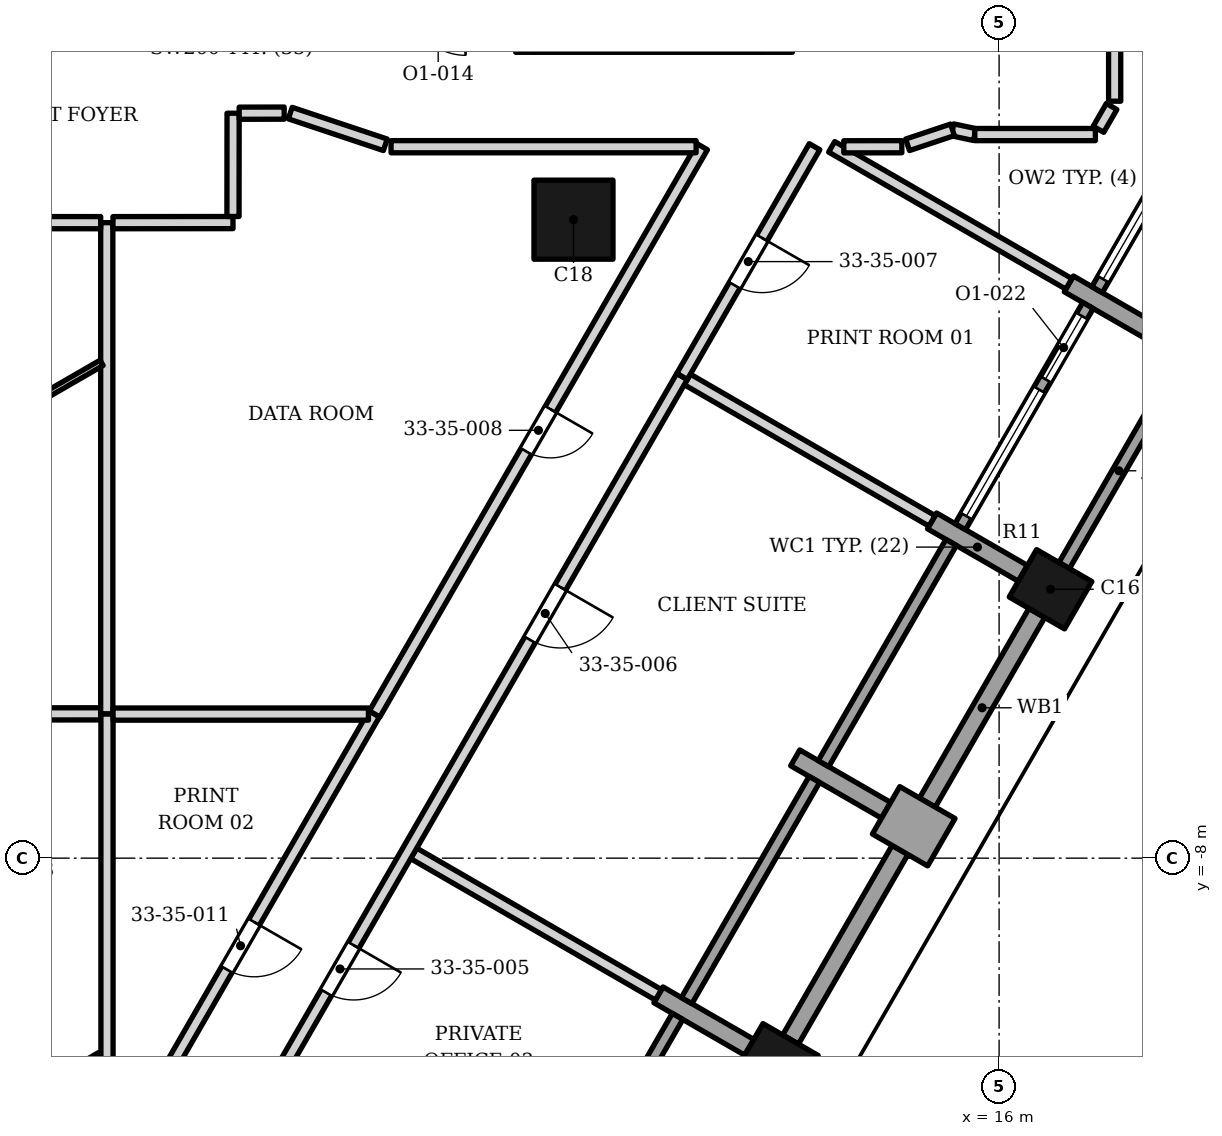
"""IFC4 building model, lengths in metres.
Left out: names, types, materials, properties, quantities, classifications, styles, units other than length and angle.
Written with IfcOpenShell. Run it as: python <this file> out.ifc"""

import sys

from ifc_helpers import new_model, si_unit, direction, frame, frame_2d, origin, origin_2d, place, context, subcontext, project, spatial, polyline, rectangle, outline, extrude, element, fill, save


model = new_model("IFC4")
c1 = context("Model", 3, precision=1e-05, world=origin(), true_north=direction((0.0, 1.0)))
c2 = subcontext(c1, "Body", "Model", "MODEL_VIEW")
j1 = project(units=[si_unit("LENGTHUNIT", "METRE"), si_unit("PLANEANGLEUNIT", "RADIAN")], contexts=[c1])
p1 = place(None, origin())
s1 = spatial("IfcSite", under=j1, at=p1, CompositionType="ELEMENT")
p2 = place(p1, origin())
s2 = spatial("IfcBuilding", under=s1, at=p2, CompositionType="ELEMENT")
p3 = place(p2, frame((0.0, 0.0, 144.6)))
s3 = spatial("IfcBuildingStorey", under=s2, at=p3, CompositionType="ELEMENT", Elevation=144.6)
p4 = place(p3, frame((9.0, 2.5, 0.0), z_axis=(0.0, 0.0, 1.0), x_axis=(1.0, 0.0, 0.0)))
e1 = element("IfcColumn", 1, at=p4, inside=s3, PredefinedType="COLUMN", context=c2, shape_type="SweptSolid", body=[
    extrude(rectangle(XDim=1.3, YDim=1.3, at=origin_2d()), origin(), (0.0, 0.0, 1.0), 3.9),
])
for number, where, z_axis, x_axis in (
    (2, (12.346, -11.373, 0.0), (0.0, 0.0, 1.0), (0.5, 0.866, 0.0)),
    (3, (16.846, -3.578, 0.0), (0.0, 0.0, 1.0), (0.5, 0.866, 0.0)),
):
    element("IfcColumn", number, at=place(p3, frame(where, z_axis=z_axis, x_axis=x_axis)), inside=s3, PredefinedType="COLUMN", context=c2, shape_type="SweptSolid", body=[
        extrude(rectangle(XDim=0.9, YDim=1.05, at=origin_2d()), origin(), (0.0, 0.0, 1.0), 3.9),
    ])
p5 = place(p3, frame((11.891, -11.11, 0.0), z_axis=(0.0, 0.0, 1.0), x_axis=(-0.866013532718, 0.500020560727, 0.0)))
e4 = element("IfcWall", 4, at=p5, inside=s3, PredefinedType="SOLIDWALL", context=c2, shape_type="SweptSolid", body=[
    extrude(rectangle(XDim=1.725, YDim=0.3, at=frame_2d((0.863, 0.0))), origin(), (0.0, 0.0, 1.0), 3.0),
])
p6 = place(p3, frame((15.05, -7.738, 0.0), z_axis=(0.0, 0.0, 1.0), x_axis=(-0.865988129768, 0.500064554934, 0.0)))
e5 = element("IfcWall", 5, at=p6, inside=s3, PredefinedType="SOLIDWALL", context=c2, shape_type="SweptSolid", body=[
    extrude(rectangle(XDim=1.05, YDim=0.9, at=frame_2d((0.525, 0.0))), origin(), (0.0, 0.0, 1.0), 3.0),
])
p7 = place(p3, frame((12.647, -6.351, 0.0), z_axis=(0.0, 0.0, 1.0), x_axis=(0.866074815912, -0.499914405916, 0.0)))
e6 = element("IfcWall", 6, at=p7, inside=s3, PredefinedType="SOLIDWALL", context=c2, shape_type="SweptSolid", body=[
    extrude(rectangle(XDim=1.725, YDim=0.3, at=frame_2d((0.862, 0.0))), origin(), (0.0, 0.0, 1.0), 3.0),
])
for number, where, z_axis, x_axis in (
    (7, (16.391, -3.316, 0.0), (0.0, 0.0, 1.0), (-0.866, 0.5, 0.0)),
    (8, (18.641, 0.581, 0.0), (0.0, 0.0, 1.0), (-0.866, 0.5, 0.0)),
):
    element("IfcWall", number, at=place(p3, frame(where, z_axis=z_axis, x_axis=x_axis)), inside=s3, PredefinedType="SOLIDWALL", context=c2, shape_type="SweptSolid", body=[
        extrude(rectangle(XDim=1.725, YDim=0.3, at=frame_2d((0.863, 0.0))), origin(), (0.0, 0.0, 1.0), 3.0),
    ])
p8 = place(p3, frame((8.612, -14.24, 0.0), z_axis=(0.0, 0.0, 1.0), x_axis=(0.500027713859, 0.866009402589, 0.0)))
e9 = element("IfcWall", 9, at=p8, inside=s3, PredefinedType="ELEMENTEDWALL", context=c2, shape_type="SweptSolid", body=[
    extrude(rectangle(XDim=4.2, YDim=0.2, at=frame_2d((2.1, 0.0))), origin(), (0.0, 0.0, 1.0), 2.95),
])
p9 = place(p3, frame((12.571, -10.983, 0.0), z_axis=(0.0, 0.0, 1.0), x_axis=(0.500012057535, 0.866018442252, 0.0)))
e10 = element("IfcWall", 10, at=p9, inside=s3, PredefinedType="SOLIDWALL", context=c2, shape_type="SweptSolid", body=[
    extrude(rectangle(XDim=3.6, YDim=0.3, at=frame_2d((1.8, 0.0))), origin(), (0.0, 0.0, 1.0), 3.0),
])
p10 = place(p3, frame((10.862, -10.343, 0.0), z_axis=(0.0, 0.0, 1.0), x_axis=(0.500002543286, 0.866023935413, 0.0)))
e11 = element("IfcWall", 11, at=p10, inside=s3, PredefinedType="ELEMENTEDWALL", context=c2, shape_type="SweptSolid", body=[
    extrude(rectangle(XDim=4.2, YDim=0.2, at=frame_2d((2.1, 0.0))), origin(), (0.0, 0.0, 1.0), 3.0),
])
p11 = place(p3, frame((14.821, -7.086, 0.0), z_axis=(0.0, 0.0, 1.0), x_axis=(0.500012057535, 0.866018442252, 0.0)))
e12 = element("IfcWall", 12, at=p11, inside=s3, PredefinedType="SOLIDWALL", context=c2, shape_type="SweptSolid", body=[
    extrude(rectangle(XDim=3.6, YDim=0.3, at=frame_2d((1.8, 0.0))), origin(), (0.0, 0.0, 1.0), 3.0),
])
p12 = place(p3, frame((13.112, -6.446, 0.0), z_axis=(0.0, 0.0, 1.0), x_axis=(0.500027713859, 0.866009402589, 0.0)))
e13 = element("IfcWall", 13, at=p12, inside=s3, PredefinedType="ELEMENTEDWALL", context=c2, shape_type="SweptSolid", body=[
    extrude(rectangle(XDim=4.2, YDim=0.2, at=frame_2d((2.1, 0.0))), origin(), (0.0, 0.0, 1.0), 3.0),
])
p13 = place(p3, origin())
e14 = element("IfcWall", 14, at=p13, inside=s3, PredefinedType="SOLIDWALL", context=c2, shape_type="SweptSolid", body=[
    extrude(outline(polyline([(18.784, -0.021), (16.984, -3.138), (17.157, -3.238), (18.957, -0.121), (18.784, -0.021)])), origin(), (0.0, 0.0, 1.0), 3.0),
])
p14 = place(p3, frame((15.362, -2.549, 0.0), z_axis=(0.0, 0.0, 1.0), x_axis=(0.500002543286, 0.866023935413, 0.0)))
e15 = element("IfcWall", 15, at=p14, inside=s3, PredefinedType="ELEMENTEDWALL", context=c2, shape_type="SweptSolid", body=[
    extrude(rectangle(XDim=4.2, YDim=0.2, at=frame_2d((2.1, 0.0))), origin(), (0.0, 0.0, 1.0), 3.0),
])
p15 = place(p14, frame((0.2, 0.0, 0.45)))
e16 = element("IfcOpeningElement", 16, at=p15, cuts=e15, PredefinedType="OPENING", context=c2, shape_type="SweptSolid", body=[
    extrude(rectangle(XDim=2.4, YDim=2.25, at=frame_2d((1.2, 1.125))), frame((0.0, 0.11, 0.0), z_axis=(0.0, -1.0, 0.0), x_axis=(1.0, 0.0, 0.0)), (0.0, 0.0, 1.0), 0.22),
])
p16 = place(p14, frame((2.8, 0.0, 0.0)))
e17 = element("IfcOpeningElement", 17, at=p16, cuts=e15, PredefinedType="OPENING", context=c2, shape_type="SweptSolid", body=[
    extrude(rectangle(XDim=1.2, YDim=2.7, at=frame_2d((0.6, 1.35))), frame((0.0, 0.11, 0.0), z_axis=(0.0, -1.0, 0.0), x_axis=(1.0, 0.0, 0.0)), (0.0, 0.0, 1.0), 0.22),
])
p17 = place(p3, frame((17.612, 1.349, 0.0), z_axis=(0.0, 0.0, 1.0), x_axis=(0.500027713859, 0.866009402589, 0.0)))
e18 = element("IfcWall", 18, at=p17, inside=s3, PredefinedType="ELEMENTEDWALL", context=c2, shape_type="SweptSolid", body=[
    extrude(rectangle(XDim=4.2, YDim=0.2, at=frame_2d((2.1, 0.0))), origin(), (0.0, 0.0, 1.0), 2.95),
])
p18 = place(p17, frame((0.2, 0.0, 0.45)))
e19 = element("IfcOpeningElement", 19, at=p18, cuts=e18, PredefinedType="OPENING", context=c2, shape_type="SweptSolid", body=[
    extrude(rectangle(XDim=3.8, YDim=2.25, at=frame_2d((1.9, 1.125))), frame((0.0, 0.11, 0.0), z_axis=(0.0, -1.0, 0.0), x_axis=(1.0, 0.0, 0.0)), (0.0, 0.0, 1.0), 0.22),
])
p19 = place(p3, frame((0.076, -15.423, 0.0), z_axis=(0.0, 0.0, 1.0), x_axis=(0.499393409799, 0.866375335666, 0.0)))
e20 = element("IfcWall", 20, at=p19, inside=s3, PredefinedType="PARTITIONING", context=c2, shape_type="SweptSolid", body=[
    extrude(rectangle(XDim=11.306, YDim=0.2, at=frame_2d((5.653, 0.0))), origin(), (0.0, 0.0, 1.0), 2.884),
])
p20 = place(p19, frame((6.455, 0.0, 0.0)))
e21 = element("IfcOpeningElement", 21, at=p20, cuts=e20, PredefinedType="OPENING", context=c2, shape_type="SweptSolid", body=[
    extrude(rectangle(XDim=0.9, YDim=2.1, at=frame_2d((0.45, 1.05))), frame((0.0, 0.11, 0.0), z_axis=(0.0, -1.0, 0.0), x_axis=(1.0, 0.0, 0.0)), (0.0, 0.0, 1.0), 0.22),
])
p21 = place(p3, frame((0.7, -11.596, 0.0), z_axis=(0.0, 0.0, 1.0), x_axis=(0.866015917575, 0.500016430238, 0.0)))
e22 = element("IfcWall", 22, at=p21, inside=s3, PredefinedType="PARTITIONING", context=c2, shape_type="SweptSolid", body=[
    extrude(rectangle(XDim=0.623, YDim=0.2, at=frame_2d((0.312, 0.0))), origin(), (0.0, 0.0, 1.0), 3.73),
])
p22 = place(p3, frame((6.371, -7.921, 0.0), z_axis=(0.0, 0.0, 1.0), x_axis=(0.865845361661, -0.500311712526, 0.0)))
e23 = element("IfcWall", 23, at=p22, inside=s3, PredefinedType="PARTITIONING", context=c2, shape_type="SweptSolid", body=[
    extrude(rectangle(XDim=4.65, YDim=0.2, at=frame_2d((2.325, 0.0))), origin(), (0.0, 0.0, 1.0), 3.052),
])
p23 = place(p3, frame((-3.435, -5.629, 0.0), z_axis=(0.0, 0.0, 1.0), x_axis=(0.999999932729, 0.000366799388, 0.0)))
e24 = element("IfcWall", 24, at=p23, inside=s3, PredefinedType="PARTITIONING", context=c2, shape_type="SweptSolid", body=[
    extrude(rectangle(XDim=4.659, YDim=0.2, at=frame_2d((2.33, 0.0))), origin(), (0.0, 0.0, 1.0), 3.73),
])
p24 = place(p3, frame((1.324, -5.627, 0.0), z_axis=(0.0, 0.0, 1.0), x_axis=(0.0, 1.0, 0.0)))
e25 = element("IfcWall", 25, at=p24, inside=s3, PredefinedType="PARTITIONING", context=c2, shape_type="SweptSolid", body=[
    extrude(rectangle(XDim=8.078, YDim=0.2, at=frame_2d((4.039, 0.0))), origin(), (0.0, 0.0, 1.0), 3.73),
])
p25 = place(p3, frame((1.328, -13.051, 0.0), z_axis=(0.0, 0.0, 1.0), x_axis=(0.0, 1.0, 0.0)))
e26 = element("IfcWall", 26, at=p25, inside=s3, PredefinedType="PARTITIONING", context=c2, shape_type="SweptSolid", body=[
    extrude(rectangle(XDim=7.42, YDim=0.2, at=frame_2d((3.71, 0.0))), origin(), (0.0, 0.0, 1.0), 2.95),
])
p26 = place(p3, frame((1.428, -5.631, 0.0), z_axis=(0.0, 0.0, 1.0), x_axis=(1.0, 0.0, 0.0)))
e27 = element("IfcWall", 27, at=p26, inside=s3, PredefinedType="PARTITIONING", context=c2, shape_type="SweptSolid", body=[
    extrude(rectangle(XDim=4.199, YDim=0.2, at=frame_2d((2.1, 0.0))), origin(), (0.0, 0.0, 1.0), 2.884),
])
p27 = place(p3, frame((5.729, -5.629, 0.0), z_axis=(0.0, 0.0, 1.0), x_axis=(0.500143553768, 0.865942507113, 0.0)))
e28 = element("IfcWall", 28, at=p27, inside=s3, PredefinedType="PARTITIONING", context=c2, shape_type="SweptSolid", body=[
    extrude(rectangle(XDim=10.773, YDim=0.2, at=frame_2d((5.386, 0.0))), origin(), (0.0, 0.0, 1.0), 3.052),
])
p28 = place(p27, frame((4.987, 0.0, 0.0)))
e29 = element("IfcOpeningElement", 29, at=p28, cuts=e28, PredefinedType="OPENING", context=c2, shape_type="SweptSolid", body=[
    extrude(rectangle(XDim=0.8, YDim=2.1, at=frame_2d((0.4, 1.05))), frame((0.0, 0.11, 0.0), z_axis=(0.0, -1.0, 0.0), x_axis=(1.0, 0.0, 0.0)), (0.0, 0.0, 1.0), 0.22),
])
p29 = place(p3, frame((10.873, -0.128, 0.0), z_axis=(0.0, 0.0, 1.0), x_axis=(0.86585748916, -0.500290723946, 0.0)))
e30 = element("IfcWall", 30, at=p29, inside=s3, PredefinedType="PARTITIONING", context=c2, shape_type="SweptSolid", body=[
    extrude(rectangle(XDim=4.648, YDim=0.2, at=frame_2d((2.324, 0.0))), origin(), (0.0, 0.0, 1.0), 3.052),
])
p30 = place(p3, frame((1.785, -15.668, 0.0), z_axis=(0.0, 0.0, 1.0), x_axis=(0.5000018851, 0.866024315419, 0.0)))
e31 = element("IfcWall", 31, at=p30, inside=s3, PredefinedType="PARTITIONING", context=c2, shape_type="SweptSolid", body=[
    extrude(rectangle(XDim=18.0, YDim=0.2, at=frame_2d((9.0, 0.0))), origin(), (0.0, 0.0, 1.0), 2.884),
])
p31 = place(p30, frame((1.8, 0.0, 0.0)))
e32 = element("IfcOpeningElement", 32, at=p31, cuts=e31, PredefinedType="OPENING", context=c2, shape_type="SweptSolid", body=[
    extrude(rectangle(XDim=0.9, YDim=2.1, at=frame_2d((0.45, 1.05))), frame((0.0, 0.11, 0.0), z_axis=(0.0, -1.0, 0.0), x_axis=(1.0, 0.0, 0.0)), (0.0, 0.0, 1.0), 0.22),
])
p32 = place(p30, frame((6.3, 0.0, 0.0)))
e33 = element("IfcOpeningElement", 33, at=p32, cuts=e31, PredefinedType="OPENING", context=c2, shape_type="SweptSolid", body=[
    extrude(rectangle(XDim=0.9, YDim=2.1, at=frame_2d((0.45, 1.05))), frame((0.0, 0.11, 0.0), z_axis=(0.0, -1.0, 0.0), x_axis=(1.0, 0.0, 0.0)), (0.0, 0.0, 1.0), 0.22),
])
p33 = place(p30, frame((13.0, 0.0, 0.0)))
e34 = element("IfcOpeningElement", 34, at=p33, cuts=e31, PredefinedType="OPENING", context=c2, shape_type="SweptSolid", body=[
    extrude(rectangle(XDim=1.0, YDim=2.1, at=frame_2d((0.5, 1.05))), frame((0.0, 0.11, 0.0), z_axis=(0.0, -1.0, 0.0), x_axis=(1.0, 0.0, 0.0)), (0.0, 0.0, 1.0), 0.22),
])
p34 = place(p3, frame((-4.759, -3.318, 0.0), z_axis=(0.0, 0.0, 1.0), x_axis=(0.866002450397, 0.500039754326, 0.0)))
e35 = element("IfcWall", 35, at=p34, inside=s3, PredefinedType="PARTITIONING", context=c2, shape_type="SweptSolid", body=[
    extrude(rectangle(XDim=6.927, YDim=0.1, at=frame_2d((3.463, 0.0))), origin(), (0.0, 0.0, 1.0), 2.884),
])
p35 = place(p3, frame((-3.4, 2.452, 0.0), z_axis=(0.0, 0.0, 1.0), x_axis=(0.999999931717, -0.000369549125, 0.0)))
e36 = element("IfcWall", 36, at=p35, inside=s3, PredefinedType="PARTITIONING", context=c2, shape_type="SweptSolid", body=[
    extrude(rectangle(XDim=4.625, YDim=0.2, at=frame_2d((2.312, 0.0))), origin(), (0.0, 0.0, 1.0), 3.73),
])
p36 = place(p3, frame((1.427, 2.451, 0.0), z_axis=(0.0, 0.0, 1.0), x_axis=(0.999999625102, 0.000865907642, 0.0)))
e37 = element("IfcWall", 37, at=p36, inside=s3, PredefinedType="PARTITIONING", context=c2, shape_type="SweptSolid", body=[
    extrude(rectangle(XDim=1.974, YDim=0.2, at=frame_2d((0.987, 0.0))), origin(), (0.0, 0.0, 1.0), 3.73),
])
p37 = place(p3, frame((6.0, 3.7, 0.0), z_axis=(0.0, 0.0, 1.0), x_axis=(1.0, 0.0, 0.0)))
e38 = element("IfcWall", 38, at=p37, inside=s3, PredefinedType="PARTITIONING", context=c2, shape_type="SweptSolid", body=[
    extrude(rectangle(XDim=5.017, YDim=0.2, at=frame_2d((2.508, 0.0))), origin(), (0.0, 0.0, 1.0), 3.332),
])
p38 = place(p3, frame((10.786, -0.078, 0.0), z_axis=(0.0, 0.0, 1.0), x_axis=(0.499631976044, 0.866237778277, 0.0)))
e39 = element("IfcWall", 39, at=p38, inside=s3, PredefinedType="PARTITIONING", context=c2, shape_type="SweptSolid", body=[
    extrude(rectangle(XDim=4.361, YDim=0.2, at=frame_2d((2.18, 0.0))), origin(), (0.0, 0.0, 1.0), 3.73),
])
p39 = place(p38, frame((1.729, 0.0, 0.0)))
e40 = element("IfcOpeningElement", 40, at=p39, cuts=e39, PredefinedType="OPENING", context=c2, shape_type="SweptSolid", body=[
    extrude(rectangle(XDim=0.9, YDim=2.1, at=frame_2d((0.45, 1.05))), frame((0.0, 0.11, 0.0), z_axis=(0.0, -1.0, 0.0), x_axis=(1.0, 0.0, 0.0)), (0.0, 0.0, 1.0), 0.22),
])
p40 = place(p3, frame((13.247, 3.698, 0.0), z_axis=(0.0, 0.0, 1.0), x_axis=(0.865845249199, -0.500311907154, 0.0)))
e41 = element("IfcWall", 41, at=p40, inside=s3, PredefinedType="PARTITIONING", context=c2, shape_type="SweptSolid", body=[
    extrude(rectangle(XDim=4.505, YDim=0.2, at=frame_2d((2.252, 0.0))), origin(), (0.0, 0.0, 1.0), 3.052),
])
p41 = place(p3, frame((13.446, 3.698, 0.0), z_axis=(0.0, 0.0, 1.0), x_axis=(0.999999181535, 0.00127942577, 0.0)))
e42 = element("IfcWall", 42, at=p41, inside=s3, PredefinedType="PARTITIONING", context=c2, shape_type="SweptSolid", body=[
    extrude(rectangle(XDim=0.954, YDim=0.2, at=frame_2d((0.477, 0.0))), origin(), (0.0, 0.0, 1.0), 3.73),
])
p42 = place(p3, frame((4.342, 4.252, 0.0), z_axis=(0.0, 0.0, 1.0), x_axis=(0.948668476379, -0.316272227557, 0.0)))
e43 = element("IfcWall", 43, at=p42, inside=s3, PredefinedType="PARTITIONING", context=c2, shape_type="SweptSolid", body=[
    extrude(rectangle(XDim=1.647, YDim=0.2, at=frame_2d((0.824, 0.0))), origin(), (0.0, 0.0, 1.0), 2.884),
])
p43 = place(p3, frame((15.234, 3.977, 0.0), z_axis=(0.0, 0.0, 1.0), x_axis=(0.978153882022, -0.207882137485, 0.0)))
e44 = element("IfcWall", 44, at=p43, inside=s3, PredefinedType="PARTITIONING", context=c2, shape_type="SweptSolid", body=[
    extrude(rectangle(XDim=0.375, YDim=0.2, at=frame_2d((0.188, 0.0))), origin(), (0.0, 0.0, 1.0), 3.73),
])
p44 = place(p3, frame((15.6, 3.899, 0.0), z_axis=(0.0, 0.0, 1.0), x_axis=(1.0, 0.0, 0.0)))
e45 = element("IfcWall", 45, at=p44, inside=s3, PredefinedType="PARTITIONING", context=c2, shape_type="SweptSolid", body=[
    extrude(rectangle(XDim=1.984, YDim=0.2, at=frame_2d((0.992, 0.0))), origin(), (0.0, 0.0, 1.0), 3.73),
])
p45 = place(p3, frame((14.495, 3.731, 0.0), z_axis=(0.0, 0.0, 1.0), x_axis=(0.948745985677, 0.316039640966, 0.0)))
e46 = element("IfcWall", 46, at=p45, inside=s3, PredefinedType="PARTITIONING", context=c2, shape_type="SweptSolid", body=[
    extrude(rectangle(XDim=0.779, YDim=0.2, at=frame_2d((0.389, 0.0))), origin(), (0.0, 0.0, 1.0), 3.73),
])
p46 = place(p3, frame((3.4, 2.552, 0.0), z_axis=(0.0, 0.0, 1.0), x_axis=(0.001150250857, 0.999999338461, 0.0)))
e47 = element("IfcWall", 47, at=p46, inside=s3, PredefinedType="PARTITIONING", context=c2, shape_type="SweptSolid", body=[
    extrude(rectangle(XDim=1.698, YDim=0.2, at=frame_2d((0.849, 0.0))), origin(), (0.0, 0.0, 1.0), 3.73),
])
p47 = place(p3, frame((3.502, 4.251, 0.0), z_axis=(0.0, 0.0, 1.0), x_axis=(0.999998041999, 0.001978887946, 0.0)))
e48 = element("IfcWall", 48, at=p47, inside=s3, PredefinedType="PARTITIONING", context=c2, shape_type="SweptSolid", body=[
    extrude(rectangle(XDim=0.74, YDim=0.2, at=frame_2d((0.37, 0.0))), origin(), (0.0, 0.0, 1.0), 3.73),
])
p48 = place(p3, frame((17.634, 3.986, 0.0), z_axis=(0.0, 0.0, 1.0), x_axis=(0.500258826225, 0.865875918815, 0.0)))
e49 = element("IfcWall", 49, at=p48, inside=s3, PredefinedType="PARTITIONING", context=c2, shape_type="SweptSolid", body=[
    extrude(rectangle(XDim=0.433, YDim=0.2, at=frame_2d((0.217, 0.0))), origin(), (0.0, 0.0, 1.0), 3.332),
])
p49 = place(p3, frame((17.9, 4.448, 0.0), z_axis=(0.0, 0.0, 1.0), x_axis=(0.0, 1.0, 0.0)))
e50 = element("IfcWall", 50, at=p49, inside=s3, PredefinedType="PARTITIONING", context=c2, shape_type="SweptSolid", body=[
    extrude(rectangle(XDim=1.705, YDim=0.2, at=frame_2d((0.852, 0.0))), origin(), (0.0, 0.0, 1.0), 2.95),
])
p50 = place(p15, origin())
e51 = element("IfcWindow", 51, at=p50, inside=s3, PartitioningType="SINGLE_PANEL", PredefinedType="WINDOW", context=c2, shape_type="SweptSolid", body=[
    extrude(rectangle(XDim=2.4, YDim=2.25, at=frame_2d((1.2, 1.125))), frame((0.0, 0.03, 0.0), z_axis=(0.0, -1.0, 0.0), x_axis=(1.0, 0.0, 0.0)), (0.0, 0.0, 1.0), 0.06),
])
fill(e16, e51)
p51 = place(p16, origin())
e52 = element("IfcDoor", 52, at=p51, inside=s3, OperationType="SINGLE_SWING_LEFT", PredefinedType="DOOR", context=c2, shape_type="SweptSolid", body=[
    extrude(rectangle(XDim=1.2, YDim=2.7, at=frame_2d((0.6, 1.35))), frame((0.0, 0.025, 0.0), z_axis=(0.0, -1.0, 0.0), x_axis=(1.0, 0.0, 0.0)), (0.0, 0.0, 1.0), 0.05),
])
fill(e17, e52)
p52 = place(p18, origin())
e53 = element("IfcWindow", 53, at=p52, inside=s3, PartitioningType="SINGLE_PANEL", PredefinedType="WINDOW", context=c2, shape_type="SweptSolid", body=[
    extrude(rectangle(XDim=3.8, YDim=2.25, at=frame_2d((1.9, 1.125))), frame((0.0, 0.03, 0.0), z_axis=(0.0, -1.0, 0.0), x_axis=(1.0, 0.0, 0.0)), (0.0, 0.0, 1.0), 0.06),
])
fill(e19, e53)
p53 = place(p32, origin())
e54 = element("IfcDoor", 54, at=p53, inside=s3, OperationType="SINGLE_SWING_RIGHT", PredefinedType="DOOR", context=c2, shape_type="SweptSolid", body=[
    extrude(rectangle(XDim=0.9, YDim=2.1, at=frame_2d((0.45, 1.05))), frame((0.0, 0.025, 0.0), z_axis=(0.0, -1.0, 0.0), x_axis=(1.0, 0.0, 0.0)), (0.0, 0.0, 1.0), 0.05),
])
fill(e33, e54)
p54 = place(p33, origin())
e55 = element("IfcDoor", 55, at=p54, inside=s3, OperationType="SINGLE_SWING_RIGHT", PredefinedType="DOOR", context=c2, shape_type="SweptSolid", body=[
    extrude(rectangle(XDim=1.0, YDim=2.1, at=frame_2d((0.5, 1.05))), frame((0.0, 0.025, 0.0), z_axis=(0.0, -1.0, 0.0), x_axis=(1.0, 0.0, 0.0)), (0.0, 0.0, 1.0), 0.05),
])
fill(e34, e55)
p55 = place(p39, origin())
e56 = element("IfcDoor", 56, at=p55, inside=s3, OperationType="SINGLE_SWING_RIGHT", PredefinedType="DOOR", context=c2, shape_type="SweptSolid", body=[
    extrude(rectangle(XDim=0.9, YDim=2.1, at=frame_2d((0.45, 1.05))), frame((0.0, 0.025, 0.0), z_axis=(0.0, -1.0, 0.0), x_axis=(1.0, 0.0, 0.0)), (0.0, 0.0, 1.0), 0.05),
])
fill(e40, e56)
p56 = place(p28, origin())
e57 = element("IfcDoor", 57, at=p56, inside=s3, OperationType="SINGLE_SWING_RIGHT", PredefinedType="DOOR", context=c2, shape_type="SweptSolid", body=[
    extrude(rectangle(XDim=0.8, YDim=2.1, at=frame_2d((0.4, 1.05))), frame((0.0, 0.025, 0.0), z_axis=(0.0, -1.0, 0.0), x_axis=(1.0, 0.0, 0.0)), (0.0, 0.0, 1.0), 0.05),
])
fill(e29, e57)
p57 = place(p20, origin())
e58 = element("IfcDoor", 58, at=p57, inside=s3, OperationType="SINGLE_SWING_RIGHT", PredefinedType="DOOR", context=c2, shape_type="SweptSolid", body=[
    extrude(rectangle(XDim=0.9, YDim=2.1, at=frame_2d((0.45, 1.05))), frame((0.0, 0.025, 0.0), z_axis=(0.0, -1.0, 0.0), x_axis=(1.0, 0.0, 0.0)), (0.0, 0.0, 1.0), 0.05),
])
fill(e21, e58)
save(model, sys.argv[1])
